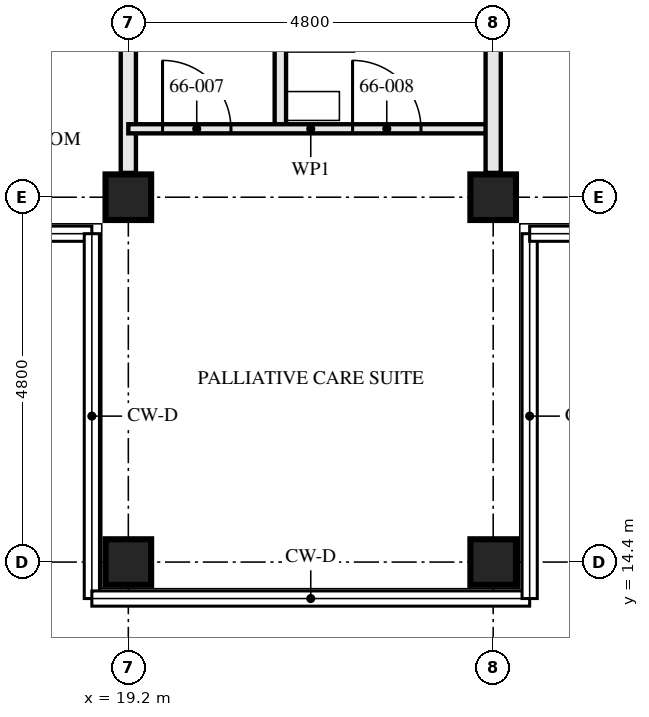
"""IFC4 building model, lengths in metres.
Left out: names, types, materials, properties, quantities, classifications, styles, units other than length and angle.
Written with IfcOpenShell. Run it as: python <this file> out.ifc"""

import sys

from ifc_helpers import new_model, si_unit, direction, frame, frame_2d, origin, origin_2d, place, context, subcontext, project, spatial, rectangle, hollow_rectangle, extrude, element, fill, save


model = new_model("IFC4")
c1 = context("Model", 3, precision=1e-05, world=origin(), true_north=direction((0.0, 1.0)))
c2 = subcontext(c1, "Body", "Model", "MODEL_VIEW")
j1 = project(units=[si_unit("LENGTHUNIT", "METRE"), si_unit("PLANEANGLEUNIT", "RADIAN")], contexts=[c1])
p1 = place(None, origin())
s1 = spatial("IfcSite", under=j1, at=p1, CompositionType="ELEMENT")
p2 = place(p1, origin())
s2 = spatial("IfcBuilding", under=s1, at=p2, CompositionType="ELEMENT")
p3 = place(p2, frame((0.0, 0.0, 240.0)))
s3 = spatial("IfcBuildingStorey", under=s2, at=p3, CompositionType="ELEMENT", Elevation=240.0)
for number, where, z_axis, x_axis in (
    (1, (19.2, 14.4, 0.0), (0.0, 0.0, 1.0), (0.0, 1.0, 0.0)),
    (2, (19.2, 19.2, 0.0), (0.0, 0.0, 1.0), (0.0, 1.0, 0.0)),
    (3, (24.0, 14.4, 0.0), (0.0, 0.0, 1.0), (0.0, 1.0, 0.0)),
    (4, (24.0, 19.2, 0.0), (0.0, 0.0, 1.0), (0.0, 1.0, 0.0)),
):
    element("IfcColumn", number, at=place(p3, frame(where, z_axis=z_axis, x_axis=x_axis)), inside=s3, PredefinedType="COLUMN", context=c2, shape_type="SweptSolid", body=[
        extrude(hollow_rectangle(XDim=0.6, YDim=0.6, WallThickness=0.05, at=origin_2d()), origin(), (0.0, 0.0, 1.0), 3.5),
    ])
p4 = place(p3, frame((19.2, 19.52, 0.0), z_axis=(0.0, 0.0, 1.0), x_axis=(0.0, 1.0, 0.0)))
e5 = element("IfcWall", 5, at=p4, inside=s3, PredefinedType="PARTITIONING", context=c2, shape_type="SweptSolid", body=[
    extrude(rectangle(XDim=7.28, YDim=0.2, at=frame_2d((3.64, 0.0))), origin(), (0.0, 0.0, 1.0), 2.04),
])
p5 = place(p3, frame((21.2, 20.1, 0.0), z_axis=(0.0, 0.0, 1.0), x_axis=(0.0, 1.0, 0.0)))
e6 = element("IfcWall", 6, at=p5, inside=s3, PredefinedType="PARTITIONING", context=c2, shape_type="SweptSolid", body=[
    extrude(rectangle(XDim=3.0, YDim=0.15, at=frame_2d((1.5, 0.0))), origin(), (0.0, 0.0, 1.0), 3.25),
])
p6 = place(p3, frame((19.2, 20.1, 0.0), z_axis=(0.0, 0.0, 1.0), x_axis=(1.0, 0.0, 0.0)))
e7 = element("IfcWall", 7, at=p6, inside=s3, PredefinedType="PARTITIONING", context=c2, shape_type="SweptSolid", body=[
    extrude(rectangle(XDim=4.8, YDim=0.12, at=frame_2d((2.4, 0.0))), origin(), (0.0, 0.0, 1.0), 3.25),
])
p7 = place(p6, frame((0.45, 0.0, 0.0)))
e8 = element("IfcOpeningElement", 8, at=p7, cuts=e7, PredefinedType="OPENING", context=c2, shape_type="SweptSolid", body=[
    extrude(rectangle(XDim=0.9, YDim=2.1, at=frame_2d((0.45, 1.05))), frame((0.0, 0.071, 0.0), z_axis=(0.0, -1.0, 0.0), x_axis=(1.0, 0.0, 0.0)), (0.0, 0.0, 1.0), 0.141),
])
p8 = place(p6, frame((2.95, 0.0, 0.0)))
e9 = element("IfcOpeningElement", 9, at=p8, cuts=e7, PredefinedType="OPENING", context=c2, shape_type="SweptSolid", body=[
    extrude(rectangle(XDim=0.9, YDim=2.1, at=frame_2d((0.45, 1.05))), frame((0.0, 0.071, 0.0), z_axis=(0.0, -1.0, 0.0), x_axis=(1.0, 0.0, 0.0)), (0.0, 0.0, 1.0), 0.141),
])
p9 = place(p3, frame((24.0, 19.52, 0.0), z_axis=(0.0, 0.0, 1.0), x_axis=(0.0, 1.0, 0.0)))
e10 = element("IfcWall", 10, at=p9, inside=s3, PredefinedType="PARTITIONING", context=c2, shape_type="SweptSolid", body=[
    extrude(rectangle(XDim=7.28, YDim=0.2, at=frame_2d((3.64, 0.0))), origin(), (0.0, 0.0, 1.0), 2.04),
])
p10 = place(p7, origin())
e11 = element("IfcDoor", 11, at=p10, inside=s3, OperationType="SINGLE_SWING_RIGHT", PredefinedType="DOOR", context=c2, shape_type="SweptSolid", body=[
    extrude(rectangle(XDim=0.9, YDim=2.1, at=frame_2d((0.45, 1.05))), frame((0.0, 0.022, 0.0), z_axis=(0.0, -1.0, 0.0), x_axis=(1.0, 0.0, 0.0)), (0.0, 0.0, 1.0), 0.044),
])
fill(e8, e11)
p11 = place(p8, origin())
e12 = element("IfcDoor", 12, at=p11, inside=s3, OperationType="SINGLE_SWING_RIGHT", PredefinedType="DOOR", context=c2, shape_type="SweptSolid", body=[
    extrude(rectangle(XDim=0.9, YDim=2.1, at=frame_2d((0.45, 1.05))), frame((0.0, 0.022, 0.0), z_axis=(0.0, -1.0, 0.0), x_axis=(1.0, 0.0, 0.0)), (0.0, 0.0, 1.0), 0.044),
])
fill(e9, e12)
save(model, sys.argv[1])
